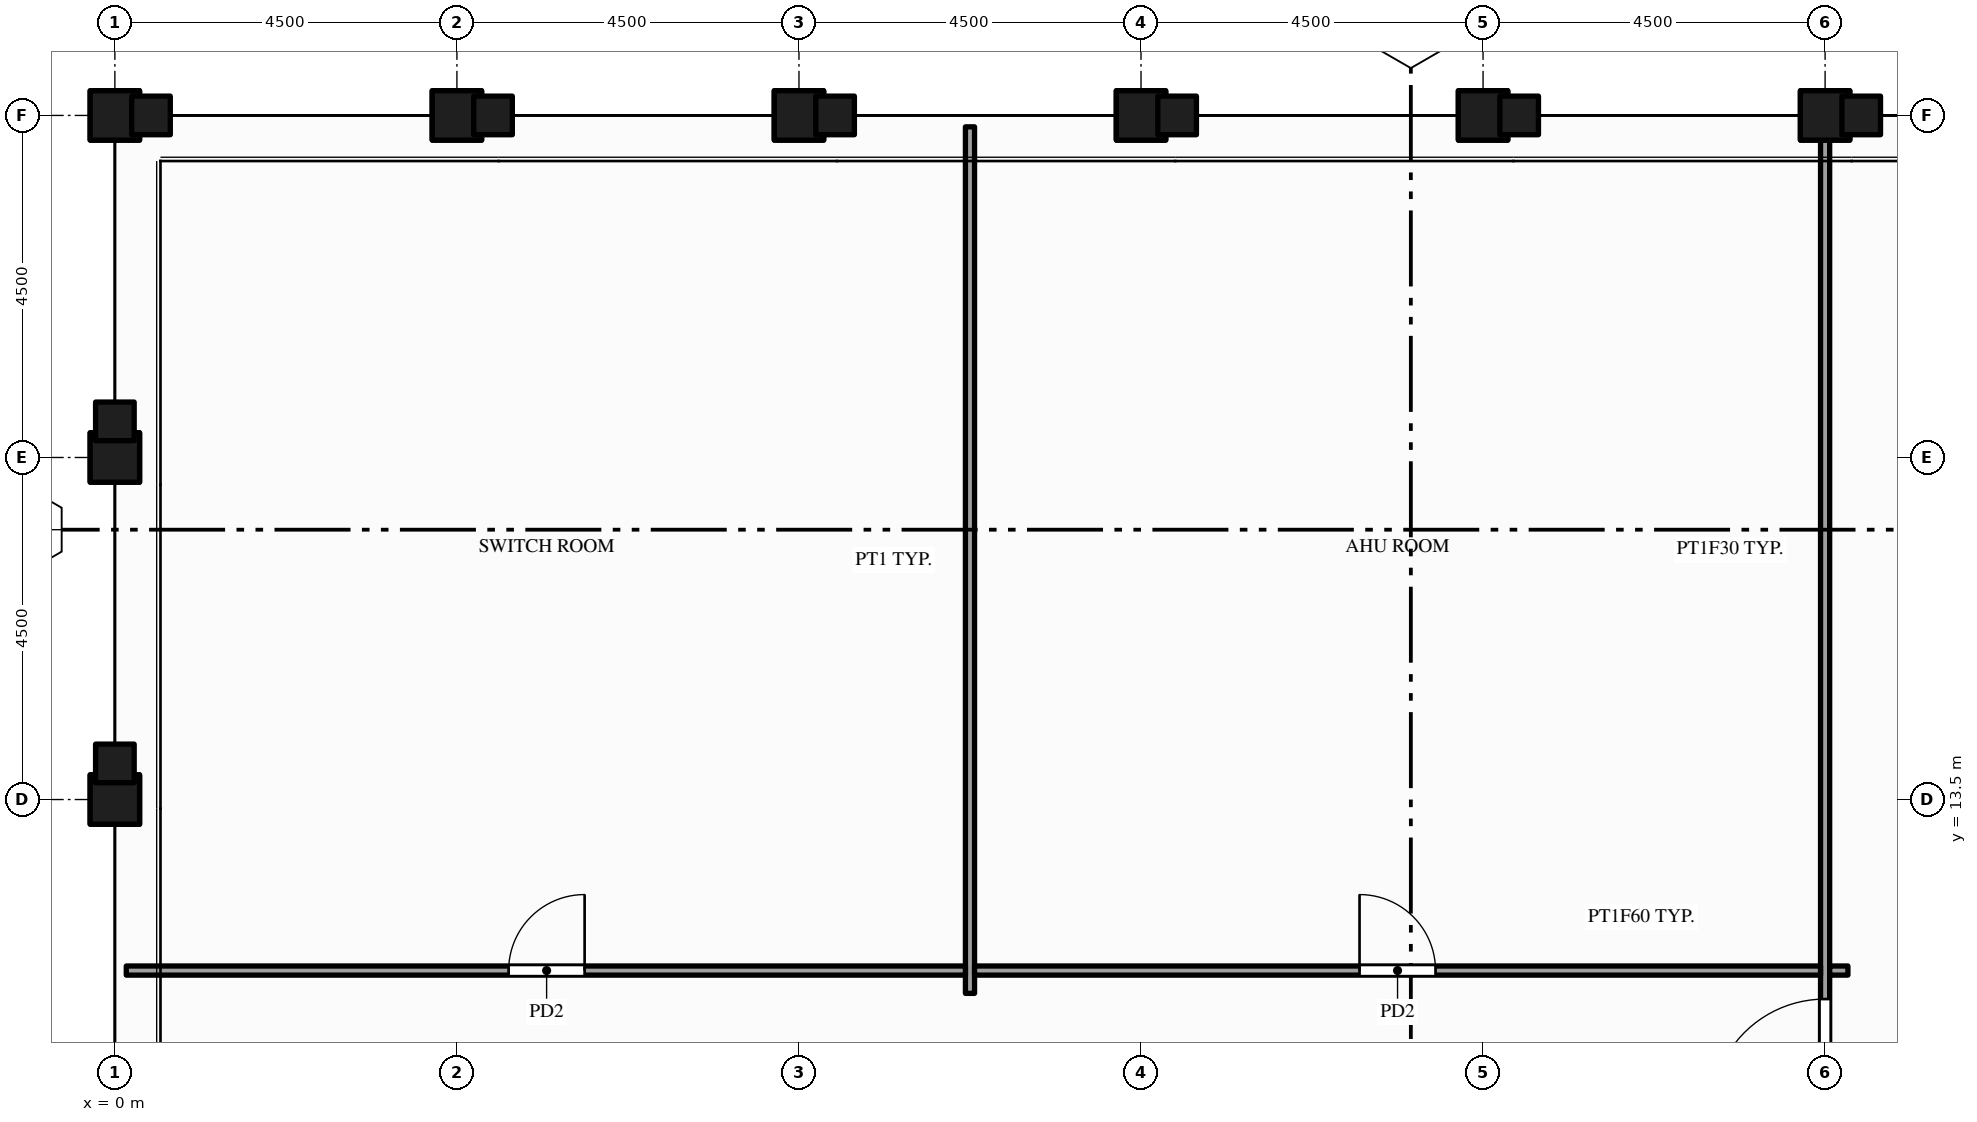
"""IFC4 building model, lengths in metres.
Left out: names, types, materials, properties, quantities, classifications, styles, units other than length and angle.
Written with IfcOpenShell. Run it as: python <this file> out.ifc"""

import sys

from ifc_helpers import new_model, si_unit, direction, frame, frame_2d, origin, origin_2d, place, context, subcontext, project, spatial, rectangle, hollow_rectangle, extrude, element, fill, save


model = new_model("IFC4")
c1 = context("Model", 3, precision=1e-05, world=origin(), true_north=direction((0.0, 1.0)))
c2 = subcontext(c1, "Body", "Model", "MODEL_VIEW")
j1 = project(units=[si_unit("LENGTHUNIT", "METRE"), si_unit("PLANEANGLEUNIT", "RADIAN")], contexts=[c1])
p1 = place(None, origin())
s1 = spatial("IfcSite", under=j1, at=p1, CompositionType="ELEMENT")
p2 = place(p1, origin())
s2 = spatial("IfcBuilding", under=s1, at=p2, CompositionType="ELEMENT")
p3 = place(p2, frame((0.0, 0.0, 297.0)))
s3 = spatial("IfcBuildingStorey", under=s2, at=p3, CompositionType="ELEMENT", Elevation=297.0)
p4 = place(p3, frame((0.0, 13.5, -0.25), z_axis=(0.0, 0.0, 1.0), x_axis=(1.0, 0.0, 0.0)))
e1 = element("IfcColumn", 1, at=p4, inside=s3, PredefinedType="COLUMN", context=c2, shape_type="SweptSolid", body=[
    extrude(hollow_rectangle(XDim=0.65, YDim=0.65, WallThickness=0.032, at=origin_2d()), origin(), (0.0, 0.0, 1.0), 6.6),
])
p5 = place(p3, frame((0.0, 13.5, 6.35), z_axis=(0.0, 0.0, 1.0), x_axis=(1.0, 0.0, 0.0)))
e2 = element("IfcColumn", 2, at=p5, inside=s3, PredefinedType="COLUMN", context=c2, shape_type="SweptSolid", body=[
    extrude(rectangle(XDim=0.65, YDim=0.65, at=origin_2d()), origin(), (0.0, 0.0, 1.0), 1.5),
])
p6 = place(p3, frame((0.0, 18.0, -0.25), z_axis=(0.0, 0.0, 1.0), x_axis=(1.0, 0.0, 0.0)))
e3 = element("IfcColumn", 3, at=p6, inside=s3, PredefinedType="COLUMN", context=c2, shape_type="SweptSolid", body=[
    extrude(hollow_rectangle(XDim=0.65, YDim=0.65, WallThickness=0.032, at=origin_2d()), origin(), (0.0, 0.0, 1.0), 6.6),
])
p7 = place(p3, frame((0.0, 18.0, 6.35), z_axis=(0.0, 0.0, 1.0), x_axis=(1.0, 0.0, 0.0)))
e4 = element("IfcColumn", 4, at=p7, inside=s3, PredefinedType="COLUMN", context=c2, shape_type="SweptSolid", body=[
    extrude(rectangle(XDim=0.65, YDim=0.65, at=origin_2d()), origin(), (0.0, 0.0, 1.0), 1.5),
])
p8 = place(p3, frame((0.0, 22.5, -0.25), z_axis=(0.0, 0.0, 1.0), x_axis=(1.0, 0.0, 0.0)))
e5 = element("IfcColumn", 5, at=p8, inside=s3, PredefinedType="COLUMN", context=c2, shape_type="SweptSolid", body=[
    extrude(hollow_rectangle(XDim=0.65, YDim=0.65, WallThickness=0.032, at=origin_2d()), origin(), (0.0, 0.0, 1.0), 6.6),
])
p9 = place(p3, frame((0.0, 22.5, 6.35), z_axis=(0.0, 0.0, 1.0), x_axis=(1.0, 0.0, 0.0)))
e6 = element("IfcColumn", 6, at=p9, inside=s3, PredefinedType="COLUMN", context=c2, shape_type="SweptSolid", body=[
    extrude(rectangle(XDim=0.65, YDim=0.65, at=origin_2d()), origin(), (0.0, 0.0, 1.0), 1.5),
])
p10 = place(p3, frame((4.5, 22.5, -0.25), z_axis=(0.0, 0.0, 1.0), x_axis=(1.0, 0.0, 0.0)))
e7 = element("IfcColumn", 7, at=p10, inside=s3, PredefinedType="COLUMN", context=c2, shape_type="SweptSolid", body=[
    extrude(hollow_rectangle(XDim=0.65, YDim=0.65, WallThickness=0.032, at=origin_2d()), origin(), (0.0, 0.0, 1.0), 6.6),
])
p11 = place(p3, frame((4.5, 22.5, 6.35), z_axis=(0.0, 0.0, 1.0), x_axis=(1.0, 0.0, 0.0)))
e8 = element("IfcColumn", 8, at=p11, inside=s3, PredefinedType="COLUMN", context=c2, shape_type="SweptSolid", body=[
    extrude(rectangle(XDim=0.65, YDim=0.65, at=origin_2d()), origin(), (0.0, 0.0, 1.0), 1.5),
])
p12 = place(p3, frame((9.0, 22.5, -0.25), z_axis=(0.0, 0.0, 1.0), x_axis=(1.0, 0.0, 0.0)))
e9 = element("IfcColumn", 9, at=p12, inside=s3, PredefinedType="COLUMN", context=c2, shape_type="SweptSolid", body=[
    extrude(hollow_rectangle(XDim=0.65, YDim=0.65, WallThickness=0.032, at=origin_2d()), origin(), (0.0, 0.0, 1.0), 6.6),
])
p13 = place(p3, frame((9.0, 22.5, 6.35), z_axis=(0.0, 0.0, 1.0), x_axis=(1.0, 0.0, 0.0)))
e10 = element("IfcColumn", 10, at=p13, inside=s3, PredefinedType="COLUMN", context=c2, shape_type="SweptSolid", body=[
    extrude(rectangle(XDim=0.65, YDim=0.65, at=origin_2d()), origin(), (0.0, 0.0, 1.0), 1.5),
])
p14 = place(p3, frame((13.5, 22.5, -0.25), z_axis=(0.0, 0.0, 1.0), x_axis=(1.0, 0.0, 0.0)))
e11 = element("IfcColumn", 11, at=p14, inside=s3, PredefinedType="COLUMN", context=c2, shape_type="SweptSolid", body=[
    extrude(hollow_rectangle(XDim=0.65, YDim=0.65, WallThickness=0.032, at=origin_2d()), origin(), (0.0, 0.0, 1.0), 6.6),
])
p15 = place(p3, frame((13.5, 22.5, 6.35), z_axis=(0.0, 0.0, 1.0), x_axis=(1.0, 0.0, 0.0)))
e12 = element("IfcColumn", 12, at=p15, inside=s3, PredefinedType="COLUMN", context=c2, shape_type="SweptSolid", body=[
    extrude(rectangle(XDim=0.65, YDim=0.65, at=origin_2d()), origin(), (0.0, 0.0, 1.0), 1.5),
])
p16 = place(p3, frame((18.0, 22.5, -0.25), z_axis=(0.0, 0.0, 1.0), x_axis=(1.0, 0.0, 0.0)))
e13 = element("IfcColumn", 13, at=p16, inside=s3, PredefinedType="COLUMN", context=c2, shape_type="SweptSolid", body=[
    extrude(hollow_rectangle(XDim=0.65, YDim=0.65, WallThickness=0.032, at=origin_2d()), origin(), (0.0, 0.0, 1.0), 6.6),
])
p17 = place(p3, frame((18.0, 22.5, 6.35), z_axis=(0.0, 0.0, 1.0), x_axis=(1.0, 0.0, 0.0)))
e14 = element("IfcColumn", 14, at=p17, inside=s3, PredefinedType="COLUMN", context=c2, shape_type="SweptSolid", body=[
    extrude(rectangle(XDim=0.65, YDim=0.65, at=origin_2d()), origin(), (0.0, 0.0, 1.0), 1.5),
])
p18 = place(p3, frame((22.5, 22.5, -0.25), z_axis=(0.0, 0.0, 1.0), x_axis=(1.0, 0.0, 0.0)))
e15 = element("IfcColumn", 15, at=p18, inside=s3, PredefinedType="COLUMN", context=c2, shape_type="SweptSolid", body=[
    extrude(hollow_rectangle(XDim=0.65, YDim=0.65, WallThickness=0.032, at=origin_2d()), origin(), (0.0, 0.0, 1.0), 6.6),
])
p19 = place(p3, frame((22.5, 22.5, 6.35), z_axis=(0.0, 0.0, 1.0), x_axis=(1.0, 0.0, 0.0)))
e16 = element("IfcColumn", 16, at=p19, inside=s3, PredefinedType="COLUMN", context=c2, shape_type="SweptSolid", body=[
    extrude(rectangle(XDim=0.65, YDim=0.65, at=origin_2d()), origin(), (0.0, 0.0, 1.0), 1.5),
])
p20 = place(p3, frame((11.25, 10.95, 0.0), z_axis=(0.0, 0.0, 1.0), x_axis=(0.0, 1.0, 0.0)))
e17 = element("IfcWall", 17, at=p20, inside=s3, PredefinedType="PARTITIONING", context=c2, shape_type="SweptSolid", body=[
    extrude(rectangle(XDim=11.4, YDim=0.12, at=frame_2d((5.7, 0.0))), origin(), (0.0, 0.0, 1.0), 6.859),
])
p21 = place(p3, frame((22.5, 0.15, 0.0), z_axis=(0.0, 0.0, 1.0), x_axis=(0.0, 1.0, 0.0)))
e18 = element("IfcWall", 18, at=p21, inside=s3, PredefinedType="PARTITIONING", context=c2, shape_type="SweptSolid", body=[
    extrude(rectangle(XDim=22.2, YDim=0.12, at=frame_2d((11.1, 0.0))), origin(), (0.0, 0.0, 1.0), 6.859),
])
p22 = place(p21, frame((9.225, 0.0, 0.0)))
e19 = element("IfcOpeningElement", 19, at=p22, cuts=e18, PredefinedType="OPENING", context=c2, shape_type="SweptSolid", body=[
    extrude(rectangle(XDim=1.5, YDim=2.1, at=frame_2d((0.75, 1.05))), frame((0.0, 0.07, 0.0), z_axis=(0.0, -1.0, 0.0), x_axis=(1.0, 0.0, 0.0)), (0.0, 0.0, 1.0), 0.14),
])
p23 = place(p3, frame((0.15, 11.25, 0.0), z_axis=(0.0, 0.0, 1.0), x_axis=(1.0, 0.0, 0.0)))
e20 = element("IfcWall", 20, at=p23, inside=s3, PredefinedType="PARTITIONING", context=c2, shape_type="SweptSolid", body=[
    extrude(rectangle(XDim=11.04, YDim=0.12, at=frame_2d((5.52, 0.0))), origin(), (0.0, 0.0, 1.0), 6.859),
])
p24 = place(p23, frame((5.03, 0.0, 0.0)))
e21 = element("IfcOpeningElement", 21, at=p24, cuts=e20, PredefinedType="OPENING", context=c2, shape_type="SweptSolid", body=[
    extrude(rectangle(XDim=1.0, YDim=2.1, at=frame_2d((0.5, 1.05))), frame((0.0, 0.07, 0.0), z_axis=(0.0, -1.0, 0.0), x_axis=(1.0, 0.0, 0.0)), (0.0, 0.0, 1.0), 0.14),
])
p25 = place(p3, frame((11.31, 11.25, 0.0), z_axis=(0.0, 0.0, 1.0), x_axis=(1.0, 0.0, 0.0)))
e22 = element("IfcWall", 22, at=p25, inside=s3, PredefinedType="PARTITIONING", context=c2, shape_type="SweptSolid", body=[
    extrude(rectangle(XDim=11.13, YDim=0.12, at=frame_2d((5.565, 0.0))), origin(), (0.0, 0.0, 1.0), 6.859),
])
p26 = place(p25, frame((5.065, 0.0, 0.0)))
e23 = element("IfcOpeningElement", 23, at=p26, cuts=e22, PredefinedType="OPENING", context=c2, shape_type="SweptSolid", body=[
    extrude(rectangle(XDim=1.0, YDim=2.1, at=frame_2d((0.5, 1.05))), frame((0.0, 0.07, 0.0), z_axis=(0.0, -1.0, 0.0), x_axis=(1.0, 0.0, 0.0)), (0.0, 0.0, 1.0), 0.14),
])
p27 = place(p3, frame((22.56, 11.25, 0.0), z_axis=(0.0, 0.0, 1.0), x_axis=(1.0, 0.0, 0.0)))
e24 = element("IfcWall", 24, at=p27, inside=s3, PredefinedType="PARTITIONING", context=c2, shape_type="SweptSolid", body=[
    extrude(rectangle(XDim=0.24, YDim=0.12, at=frame_2d((0.12, 0.0))), origin(), (0.0, 0.0, 1.0), 6.859),
])
p28 = place(p24, origin())
e25 = element("IfcDoor", 25, at=p28, inside=s3, OperationType="SINGLE_SWING_RIGHT", PredefinedType="DOOR", context=c2, shape_type="SweptSolid", body=[
    extrude(rectangle(XDim=1.0, YDim=2.1, at=frame_2d((0.5, 1.05))), frame((0.0, 0.025, 0.0), z_axis=(0.0, -1.0, 0.0), x_axis=(1.0, 0.0, 0.0)), (0.0, 0.0, 1.0), 0.05),
])
fill(e21, e25)
p29 = place(p26, origin())
e26 = element("IfcDoor", 26, at=p29, inside=s3, OperationType="SINGLE_SWING_LEFT", PredefinedType="DOOR", context=c2, shape_type="SweptSolid", body=[
    extrude(rectangle(XDim=1.0, YDim=2.1, at=frame_2d((0.5, 1.05))), frame((0.0, 0.025, 0.0), z_axis=(0.0, -1.0, 0.0), x_axis=(1.0, 0.0, 0.0)), (0.0, 0.0, 1.0), 0.05),
])
fill(e23, e26)
p30 = place(p22, origin())
e27 = element("IfcDoor", 27, at=p30, inside=s3, OperationType="SINGLE_SWING_LEFT", PredefinedType="DOOR", context=c2, shape_type="SweptSolid", body=[
    extrude(rectangle(XDim=1.5, YDim=2.1, at=frame_2d((0.75, 1.05))), frame((0.0, 0.025, 0.0), z_axis=(0.0, -1.0, 0.0), x_axis=(1.0, 0.0, 0.0)), (0.0, 0.0, 1.0), 0.05),
])
fill(e19, e27)
save(model, sys.argv[1])
